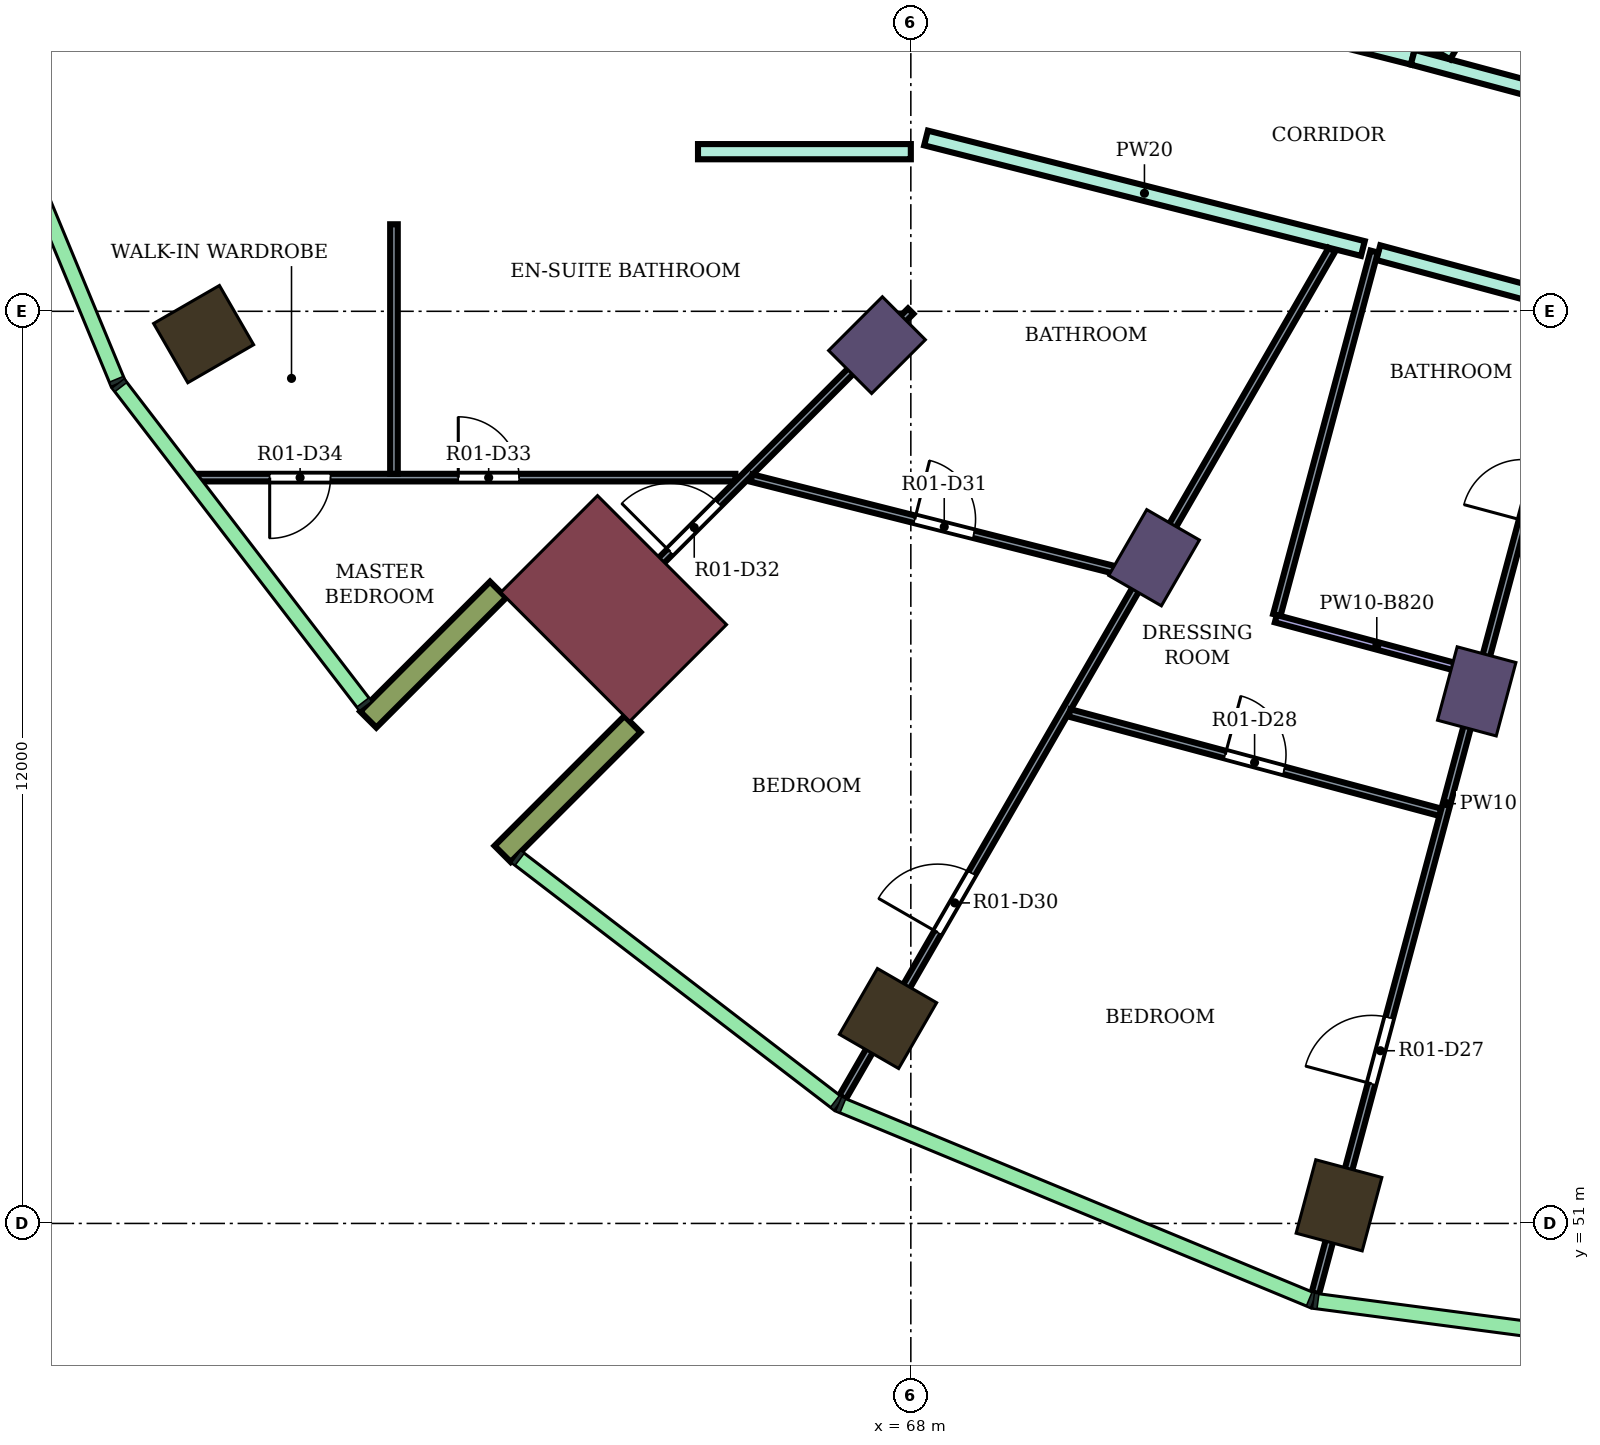
"""IFC4 building model, lengths in metres.
Left out: names, types, materials, properties, quantities, classifications, styles, units other than length and angle.
Written with IfcOpenShell. Run it as: python <this file> out.ifc"""

import sys

from ifc_helpers import new_model, si_unit, direction, frame, frame_2d, origin, origin_2d, place, context, subcontext, project, spatial, rectangle, extrude, element, fill, save


model = new_model("IFC4")
c1 = context("Model", 3, precision=1e-05, world=origin(), true_north=direction((0.0, 1.0)))
c2 = subcontext(c1, "Body", "Model", "MODEL_VIEW")
j1 = project(units=[si_unit("LENGTHUNIT", "METRE"), si_unit("PLANEANGLEUNIT", "RADIAN")], contexts=[c1])
p1 = place(None, origin())
s1 = spatial("IfcSite", under=j1, at=p1, CompositionType="ELEMENT")
p2 = place(p1, origin())
s2 = spatial("IfcBuilding", under=s1, at=p2, CompositionType="ELEMENT")
p3 = place(p2, frame((0.0, 0.0, 157.7)))
s3 = spatial("IfcBuildingStorey", under=s2, at=p3, CompositionType="ELEMENT", Elevation=157.7)
for number, where, z_axis, x_axis in (
    (1, (58.696, 62.7, 0.0), (0.0, 0.0, 1.0), (-0.866, -0.5, 0.0)),
    (2, (67.7, 53.696, 0.0), (0.0, 0.0, 1.0), (-0.5, -0.866, 0.0)),
    (3, (73.633, 51.238, 0.0), (0.0, 0.0, 1.0), (-0.259, -0.966, 0.0)),
):
    element("IfcColumn", number, at=place(p3, frame(where, z_axis=z_axis, x_axis=x_axis)), inside=s3, PredefinedType="COLUMN", context=c2, shape_type="SweptSolid", body=[
        extrude(rectangle(XDim=1.0, YDim=0.9, at=origin_2d()), origin(), (0.0, 0.0, 1.0), 4.1),
    ])
for number, where, z_axis, x_axis in (
    (4, (67.555, 62.555, 0.0), (0.0, 0.0, 1.0), (-0.707, -0.707, 0.0)),
    (5, (71.2, 59.758, 0.0), (0.0, 0.0, 1.0), (-0.5, -0.866, 0.0)),
    (6, (75.445, 58.0, 0.0), (0.0, 0.0, 1.0), (-0.259, -0.966, 0.0)),
):
    element("IfcColumn", number, at=place(p3, frame(where, z_axis=z_axis, x_axis=x_axis)), inside=s3, PredefinedType="COLUMN", context=c2, shape_type="SweptSolid", body=[
        extrude(rectangle(XDim=1.0, YDim=0.8, at=origin_2d()), origin(), (0.0, 0.0, 1.0), 4.1),
    ])
p4 = place(p3, frame((64.09, 59.09, 0.0), z_axis=(0.0, 0.0, 1.0), x_axis=(-0.707106781187, -0.707106781187, 0.0)))
e7 = element("IfcColumn", 7, at=p4, inside=s3, PredefinedType="COLUMN", context=c2, shape_type="SweptSolid", body=[
    extrude(rectangle(XDim=1.8, YDim=2.4, at=origin_2d()), origin(), (0.0, 0.0, 1.0), 4.1),
])
for number, where, z_axis, x_axis in (
    (8, (62.57, 59.338, 0.0), (0.0, 0.0, 1.0), (-0.707, -0.707, 0.0)),
    (9, (64.338, 57.57, 0.0), (0.0, 0.0, 1.0), (-0.707, -0.707, 0.0)),
):
    element("IfcWall", number, at=place(p3, frame(where, z_axis=z_axis, x_axis=x_axis)), inside=s3, PredefinedType="NOTDEFINED", context=c2, shape_type="SweptSolid", body=[
        extrude(rectangle(XDim=2.416, YDim=0.3, at=frame_2d((1.208, 0.0))), origin(), (0.0, 0.0, 1.0), 4.1),
    ])
p5 = place(p3, frame((65.2, 65.1, 0.0), z_axis=(0.0, 0.0, 1.0), x_axis=(1.0, 0.0, 0.0)))
e10 = element("IfcWall", 10, at=p5, inside=s3, PredefinedType="PARTITIONING", context=c2, shape_type="SweptSolid", body=[
    extrude(rectangle(XDim=2.8, YDim=0.2, at=frame_2d((1.4, 0.0))), origin(), (0.0, 0.0, 1.0), 3.65),
])
p6 = place(p3, frame((68.2, 65.28, 0.0), z_axis=(0.0, 0.0, 1.0), x_axis=(0.969450596516, -0.245286650503, 0.0)))
e11 = element("IfcWall", 11, at=p6, inside=s3, PredefinedType="PARTITIONING", context=c2, shape_type="SweptSolid", body=[
    extrude(rectangle(XDim=5.928, YDim=0.2, at=frame_2d((2.964, 0.0))), origin(), (0.0, 0.0, 1.0), 3.65),
])
p7 = place(p3, frame((72.1, 66.975, 0.0), z_axis=(0.0, 0.0, 1.0), x_axis=(0.969471314457, -0.245204752086, 0.0)))
e12 = element("IfcWall", 12, at=p7, inside=s3, PredefinedType="PARTITIONING", context=c2, shape_type="SweptSolid", body=[
    extrude(rectangle(XDim=2.582, YDim=0.2, at=frame_2d((1.291, 0.0))), origin(), (0.0, 0.0, 1.0), 3.65),
])
p8 = place(p7, frame((0.841, 0.0, 0.0)))
e13 = element("IfcOpeningElement", 13, at=p8, cuts=e12, PredefinedType="OPENING", context=c2, shape_type="SweptSolid", body=[
    extrude(rectangle(XDim=0.9, YDim=2.1, at=frame_2d((0.45, 1.05))), frame((0.0, 0.11, 0.0), z_axis=(0.0, -1.0, 0.0), x_axis=(1.0, 0.0, 0.0)), (0.0, 0.0, 1.0), 0.22),
])
p9 = place(p3, frame((74.15, 63.772, 0.0), z_axis=(0.0, 0.0, 1.0), x_axis=(0.965807109237, -0.259261697417, 0.0)))
e14 = element("IfcWall", 14, at=p9, inside=s3, PredefinedType="PARTITIONING", context=c2, shape_type="SweptSolid", body=[
    extrude(rectangle(XDim=5.967, YDim=0.2, at=frame_2d((2.983, 0.0))), origin(), (0.0, 0.0, 1.0), 3.65),
])
p10 = place(p9, frame((4.507, 0.0, 0.0)))
e15 = element("IfcOpeningElement", 15, at=p10, cuts=e14, PredefinedType="OPENING", context=c2, shape_type="SweptSolid", body=[
    extrude(rectangle(XDim=1.0, YDim=2.1, at=frame_2d((0.5, 1.05))), frame((0.0, 0.11, 0.0), z_axis=(0.0, -1.0, 0.0), x_axis=(1.0, 0.0, 0.0)), (0.0, 0.0, 1.0), 0.22),
])
p11 = place(p3, frame((74.603, 66.342, 0.0), z_axis=(0.0, 0.0, 1.0), x_axis=(0.965920893652, -0.258837453254, 0.0)))
e16 = element("IfcWall", 16, at=p11, inside=s3, PredefinedType="PARTITIONING", context=c2, shape_type="SweptSolid", body=[
    extrude(rectangle(XDim=5.458, YDim=0.2, at=frame_2d((2.729, 0.0))), origin(), (0.0, 0.0, 1.0), 3.65),
])
p12 = place(p11, frame((2.512, 0.0, 0.0)))
e17 = element("IfcOpeningElement", 17, at=p12, cuts=e16, PredefinedType="OPENING", context=c2, shape_type="SweptSolid", body=[
    extrude(rectangle(XDim=0.9, YDim=2.1, at=frame_2d((0.45, 1.05))), frame((0.0, 0.11, 0.0), z_axis=(0.0, -1.0, 0.0), x_axis=(1.0, 0.0, 0.0)), (0.0, 0.0, 1.0), 0.22),
])
p13 = place(p3, frame((75.01, 66.364, 0.0), z_axis=(0.0, 0.0, 1.0), x_axis=(0.50017749597, 0.865922902183, 0.0)))
e18 = element("IfcWall", 18, at=p13, inside=s3, PredefinedType="PARTITIONING", context=c2, shape_type="SweptSolid", body=[
    extrude(rectangle(XDim=2.276, YDim=0.2, at=frame_2d((1.138, 0.0))), origin(), (0.0, 0.0, 1.0), 3.65),
])
p14 = place(p3, frame((58.6, 60.812, 0.0), z_axis=(0.0, 0.0, 1.0), x_axis=(1.0, 0.0, 0.0)))
e19 = element("IfcWall", 19, at=p14, inside=s3, PredefinedType="PARTITIONING", context=c2, shape_type="SweptSolid", body=[
    extrude(rectangle(XDim=7.092, YDim=0.1, at=frame_2d((3.546, 0.0))), origin(), (0.0, 0.0, 1.0), 3.65),
])
p15 = place(p14, frame((3.446, 0.0, 0.0)))
e20 = element("IfcOpeningElement", 20, at=p15, cuts=e19, PredefinedType="OPENING", context=c2, shape_type="SweptSolid", body=[
    extrude(rectangle(XDim=0.8, YDim=2.1, at=frame_2d((0.4, 1.05))), frame((0.0, 0.06, 0.0), z_axis=(0.0, -1.0, 0.0), x_axis=(1.0, 0.0, 0.0)), (0.0, 0.0, 1.0), 0.12),
])
p16 = place(p14, frame((0.965, 0.0, 0.0)))
e21 = element("IfcOpeningElement", 21, at=p16, cuts=e19, PredefinedType="OPENING", context=c2, shape_type="SweptSolid", body=[
    extrude(rectangle(XDim=0.8, YDim=2.1, at=frame_2d((0.4, 1.05))), frame((0.0, 0.06, 0.0), z_axis=(0.0, -1.0, 0.0), x_axis=(1.0, 0.0, 0.0)), (0.0, 0.0, 1.0), 0.12),
])
p17 = place(p3, frame((61.2, 60.862, 0.0), z_axis=(0.0, 0.0, 1.0), x_axis=(0.0, 1.0, 0.0)))
e22 = element("IfcWall", 22, at=p17, inside=s3, PredefinedType="PARTITIONING", context=c2, shape_type="SweptSolid", body=[
    extrude(rectangle(XDim=3.283, YDim=0.1, at=frame_2d((1.642, 0.0))), origin(), (0.0, 0.0, 1.0), 3.65),
])
p18 = place(p3, frame((63.593, 58.598, 0.0), z_axis=(0.0, 0.0, 1.0), x_axis=(0.707243952197, 0.706969583561, 0.0)))
e23 = element("IfcWall", 23, at=p18, inside=s3, PredefinedType="PARTITIONING", context=c2, shape_type="SweptSolid", body=[
    extrude(rectangle(XDim=6.229, YDim=0.1, at=frame_2d((3.114, 0.0))), origin(), (0.0, 0.0, 1.0), 3.65),
])
p19 = place(p18, frame((1.752, 0.0, 0.0)))
e24 = element("IfcOpeningElement", 24, at=p19, cuts=e23, PredefinedType="OPENING", context=c2, shape_type="SweptSolid", body=[
    extrude(rectangle(XDim=0.9, YDim=2.1, at=frame_2d((0.45, 1.05))), frame((0.0, 0.06, 0.0), z_axis=(0.0, -1.0, 0.0), x_axis=(1.0, 0.0, 0.0)), (0.0, 0.0, 1.0), 0.12),
])
p20 = place(p3, frame((65.904, 60.806, 0.0), z_axis=(0.0, 0.0, 1.0), x_axis=(0.969477107154, -0.245181848237, 0.0)))
e25 = element("IfcWall", 25, at=p20, inside=s3, PredefinedType="PARTITIONING", context=c2, shape_type="SweptSolid", body=[
    extrude(rectangle(XDim=5.252, YDim=0.1, at=frame_2d((2.626, 0.0))), origin(), (0.0, 0.0, 1.0), 3.65),
])
p21 = place(p20, frame((2.216, 0.0, 0.0)))
e26 = element("IfcOpeningElement", 26, at=p21, cuts=e25, PredefinedType="OPENING", context=c2, shape_type="SweptSolid", body=[
    extrude(rectangle(XDim=0.8, YDim=2.1, at=frame_2d((0.4, 1.05))), frame((0.0, 0.06, 0.0), z_axis=(0.0, -1.0, 0.0), x_axis=(1.0, 0.0, 0.0)), (0.0, 0.0, 1.0), 0.12),
])
p22 = place(p3, frame((67.101, 52.659, 0.0), z_axis=(0.0, 0.0, 1.0), x_axis=(0.499985055897, 0.866034031594, 0.0)))
e27 = element("IfcWall", 27, at=p22, inside=s3, PredefinedType="PARTITIONING", context=c2, shape_type="SweptSolid", body=[
    extrude(rectangle(XDim=12.876, YDim=0.1, at=frame_2d((6.438, 0.0))), origin(), (0.0, 0.0, 1.0), 3.65),
])
p23 = place(p22, frame((2.504, 0.0, 0.0)))
e28 = element("IfcOpeningElement", 28, at=p23, cuts=e27, PredefinedType="OPENING", context=c2, shape_type="SweptSolid", body=[
    extrude(rectangle(XDim=0.9, YDim=2.1, at=frame_2d((0.45, 1.05))), frame((0.0, 0.06, 0.0), z_axis=(0.0, -1.0, 0.0), x_axis=(1.0, 0.0, 0.0)), (0.0, 0.0, 1.0), 0.12),
])
p24 = place(p3, frame((70.088, 57.717, 0.0), z_axis=(0.0, 0.0, 1.0), x_axis=(0.965906836082, -0.258889907124, 0.0)))
e29 = element("IfcWall", 29, at=p24, inside=s3, PredefinedType="PARTITIONING", context=c2, shape_type="SweptSolid", body=[
    extrude(rectangle(XDim=5.051, YDim=0.1, at=frame_2d((2.525, 0.0))), origin(), (0.0, 0.0, 1.0), 3.65),
])
p25 = place(p24, frame((2.121, 0.0, 0.0)))
e30 = element("IfcOpeningElement", 30, at=p25, cuts=e29, PredefinedType="OPENING", context=c2, shape_type="SweptSolid", body=[
    extrude(rectangle(XDim=0.8, YDim=2.1, at=frame_2d((0.4, 1.05))), frame((0.0, 0.06, 0.0), z_axis=(0.0, -1.0, 0.0), x_axis=(1.0, 0.0, 0.0)), (0.0, 0.0, 1.0), 0.12),
])
p26 = place(p3, frame((72.815, 59.004, 0.0), z_axis=(0.0, 0.0, 1.0), x_axis=(0.25878292514, 0.96593550388, 0.0)))
e31 = element("IfcWall", 31, at=p26, inside=s3, PredefinedType="PARTITIONING", context=c2, shape_type="SweptSolid", body=[
    extrude(rectangle(XDim=4.95, YDim=0.1, at=frame_2d((2.475, 0.0))), origin(), (0.0, 0.0, 1.0), 3.65),
])
p27 = place(p3, frame((72.802, 58.956, 0.0), z_axis=(0.0, 0.0, 1.0), x_axis=(0.965887802097, -0.258960911647, 0.0)))
e32 = element("IfcWall", 32, at=p27, inside=s3, PredefinedType="PARTITIONING", context=c2, shape_type="SweptSolid", body=[
    extrude(rectangle(XDim=2.75, YDim=0.1, at=frame_2d((1.375, 0.0))), origin(), (0.0, 0.0, 1.0), 3.28),
])
p28 = place(p3, frame((73.322, 50.081, 0.0), z_axis=(0.0, 0.0, 1.0), x_axis=(0.258982801816, 0.965881932931, 0.0)))
e33 = element("IfcWall", 33, at=p28, inside=s3, PredefinedType="PARTITIONING", context=c2, shape_type="SweptSolid", body=[
    extrude(rectangle(XDim=13.338, YDim=0.1, at=frame_2d((6.669, 0.0))), origin(), (0.0, 0.0, 1.0), 3.65),
])
p29 = place(p28, frame((2.854, 0.0, 0.0)))
e34 = element("IfcOpeningElement", 34, at=p29, cuts=e33, PredefinedType="OPENING", context=c2, shape_type="SweptSolid", body=[
    extrude(rectangle(XDim=0.9, YDim=2.1, at=frame_2d((0.45, 1.05))), frame((0.0, 0.06, 0.0), z_axis=(0.0, -1.0, 0.0), x_axis=(1.0, 0.0, 0.0)), (0.0, 0.0, 1.0), 0.12),
])
p30 = place(p28, frame((10.528, 0.0, 0.0)))
e35 = element("IfcOpeningElement", 35, at=p30, cuts=e33, PredefinedType="OPENING", context=c2, shape_type="SweptSolid", body=[
    extrude(rectangle(XDim=0.8, YDim=2.1, at=frame_2d((0.4, 1.05))), frame((0.0, 0.06, 0.0), z_axis=(0.0, -1.0, 0.0), x_axis=(1.0, 0.0, 0.0)), (0.0, 0.0, 1.0), 0.12),
])
p31 = place(p29, origin())
e36 = element("IfcDoor", 36, at=p31, inside=s3, OperationType="SINGLE_SWING_LEFT", PredefinedType="DOOR", context=c2, shape_type="SweptSolid", body=[
    extrude(rectangle(XDim=0.9, YDim=2.1, at=frame_2d((0.45, 1.05))), frame((0.0, 0.025, 0.0), z_axis=(0.0, -1.0, 0.0), x_axis=(1.0, 0.0, 0.0)), (0.0, 0.0, 1.0), 0.05),
])
fill(e34, e36)
p32 = place(p25, origin())
e37 = element("IfcDoor", 37, at=p32, inside=s3, OperationType="SINGLE_SWING_LEFT", PredefinedType="DOOR", context=c2, shape_type="SweptSolid", body=[
    extrude(rectangle(XDim=0.8, YDim=2.1, at=frame_2d((0.4, 1.05))), frame((0.0, 0.025, 0.0), z_axis=(0.0, -1.0, 0.0), x_axis=(1.0, 0.0, 0.0)), (0.0, 0.0, 1.0), 0.05),
])
fill(e30, e37)
p33 = place(p23, origin())
e38 = element("IfcDoor", 38, at=p33, inside=s3, OperationType="SINGLE_SWING_LEFT", PredefinedType="DOOR", context=c2, shape_type="SweptSolid", body=[
    extrude(rectangle(XDim=0.9, YDim=2.1, at=frame_2d((0.45, 1.05))), frame((0.0, 0.025, 0.0), z_axis=(0.0, -1.0, 0.0), x_axis=(1.0, 0.0, 0.0)), (0.0, 0.0, 1.0), 0.05),
])
fill(e28, e38)
p34 = place(p21, origin())
e39 = element("IfcDoor", 39, at=p34, inside=s3, OperationType="SINGLE_SWING_LEFT", PredefinedType="DOOR", context=c2, shape_type="SweptSolid", body=[
    extrude(rectangle(XDim=0.8, YDim=2.1, at=frame_2d((0.4, 1.05))), frame((0.0, 0.025, 0.0), z_axis=(0.0, -1.0, 0.0), x_axis=(1.0, 0.0, 0.0)), (0.0, 0.0, 1.0), 0.05),
])
fill(e26, e39)
p35 = place(p19, origin())
e40 = element("IfcDoor", 40, at=p35, inside=s3, OperationType="SINGLE_SWING_LEFT", PredefinedType="DOOR", context=c2, shape_type="SweptSolid", body=[
    extrude(rectangle(XDim=0.9, YDim=2.1, at=frame_2d((0.45, 1.05))), frame((0.0, 0.025, 0.0), z_axis=(0.0, -1.0, 0.0), x_axis=(1.0, 0.0, 0.0)), (0.0, 0.0, 1.0), 0.05),
])
fill(e24, e40)
p36 = place(p15, origin())
e41 = element("IfcDoor", 41, at=p36, inside=s3, OperationType="SINGLE_SWING_LEFT", PredefinedType="DOOR", context=c2, shape_type="SweptSolid", body=[
    extrude(rectangle(XDim=0.8, YDim=2.1, at=frame_2d((0.4, 1.05))), frame((0.0, 0.025, 0.0), z_axis=(0.0, -1.0, 0.0), x_axis=(1.0, 0.0, 0.0)), (0.0, 0.0, 1.0), 0.05),
])
fill(e20, e41)
p37 = place(p16, frame((0.8, 0.0, 0.0), z_axis=(0.0, 0.0, 1.0), x_axis=(-1.0, 0.0, 0.0)))
e42 = element("IfcDoor", 42, at=p37, inside=s3, OperationType="SINGLE_SWING_RIGHT", PredefinedType="DOOR", context=c2, shape_type="SweptSolid", body=[
    extrude(rectangle(XDim=0.8, YDim=2.1, at=frame_2d((0.4, 1.05))), frame((0.0, 0.025, 0.0), z_axis=(0.0, -1.0, 0.0), x_axis=(1.0, 0.0, 0.0)), (0.0, 0.0, 1.0), 0.05),
])
fill(e21, e42)
save(model, sys.argv[1])
